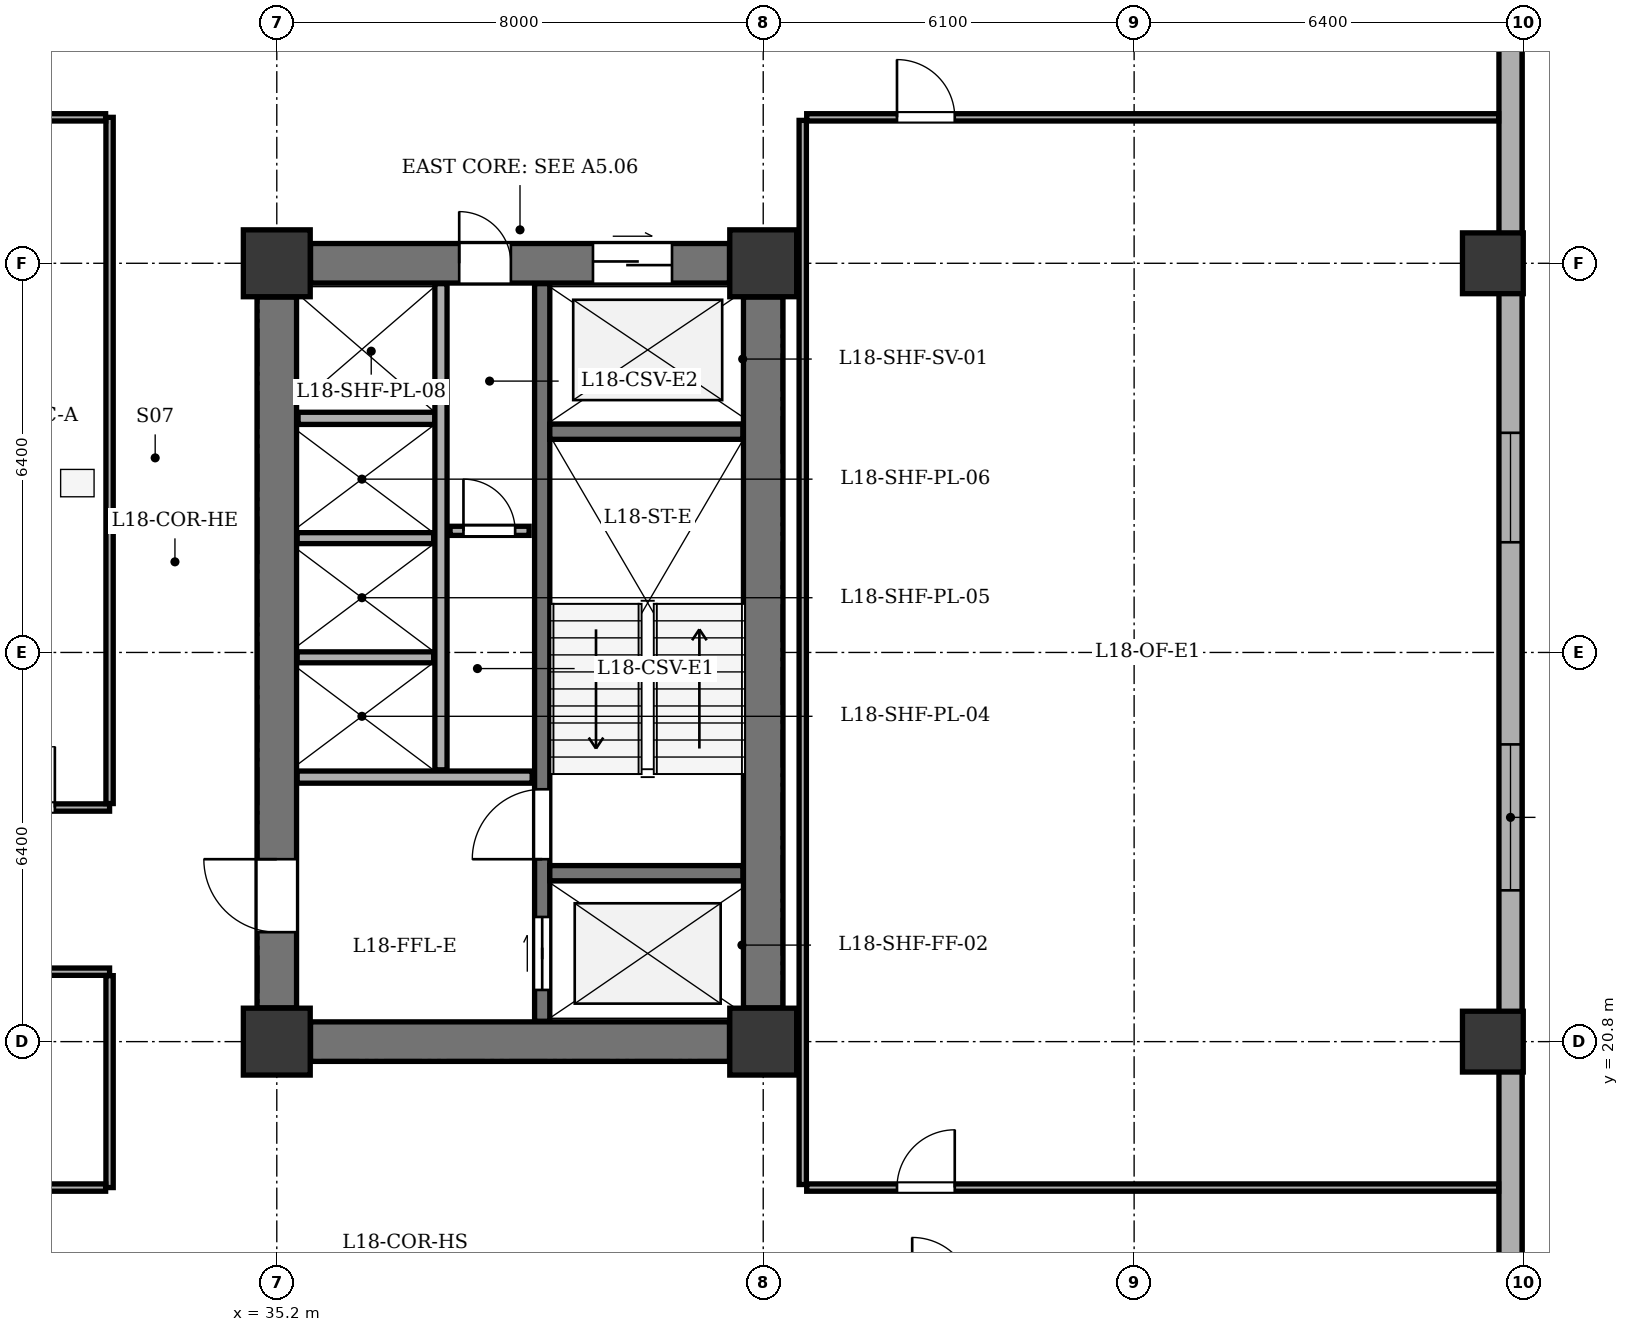
"""IFC4 building model, lengths in metres.
Left out: names, types, materials, properties, quantities, classifications, styles, units other than length and angle.
Written with IfcOpenShell. Run it as: python <this file> out.ifc"""

import sys

from ifc_helpers import new_model, si_unit, direction, frame, frame_2d, origin, origin_2d, place, context, subcontext, project, spatial, rectangle, extrude, element, fill, save


model = new_model("IFC4")
c1 = context("Model", 3, precision=1e-05, world=origin(), true_north=direction((0.0, 1.0)))
c2 = subcontext(c1, "Body", "Model", "MODEL_VIEW")
j1 = project(units=[si_unit("LENGTHUNIT", "METRE"), si_unit("PLANEANGLEUNIT", "RADIAN")], contexts=[c1])
p1 = place(None, origin())
s1 = spatial("IfcSite", under=j1, at=p1, CompositionType="ELEMENT")
p2 = place(p1, origin())
s2 = spatial("IfcBuilding", under=s1, at=p2, CompositionType="ELEMENT")
p3 = place(p2, frame((0.0, 0.0, 75.0)))
s3 = spatial("IfcBuildingStorey", under=s2, at=p3, CompositionType="ELEMENT", Elevation=75.0)
for number, where, z_axis, x_axis in (
    (1, (35.2, 20.8, 0.0), (0.0, 0.0, 1.0), (1.0, 0.0, 0.0)),
    (2, (43.2, 20.8, 0.0), (0.0, 0.0, 1.0), (1.0, 0.0, 0.0)),
    (3, (35.2, 33.6, 0.0), (0.0, 0.0, 1.0), (1.0, 0.0, 0.0)),
    (4, (43.2, 33.6, 0.0), (0.0, 0.0, 1.0), (1.0, 0.0, 0.0)),
):
    element("IfcColumn", number, at=place(p3, frame(where, z_axis=z_axis, x_axis=x_axis)), inside=s3, PredefinedType="COLUMN", context=c2, shape_type="SweptSolid", body=[
        extrude(rectangle(XDim=1.1, YDim=1.1, at=origin_2d()), origin(), (0.0, 0.0, 1.0), 3.9),
    ])
for number, where, z_axis, x_axis in (
    (5, (55.2, 20.8, 0.0), (0.0, 0.0, 1.0), (1.0, 0.0, 0.0)),
    (6, (55.2, 33.6, 0.0), (0.0, 0.0, 1.0), (1.0, 0.0, 0.0)),
):
    element("IfcColumn", number, at=place(p3, frame(where, z_axis=z_axis, x_axis=x_axis)), inside=s3, PredefinedType="COLUMN", context=c2, shape_type="SweptSolid", body=[
        extrude(rectangle(XDim=1.0, YDim=1.0, at=origin_2d()), origin(), (0.0, 0.0, 1.0), 3.9),
    ])
p4 = place(p3, frame((55.49, 47.9, 0.0), z_axis=(0.0, 0.0, 1.0), x_axis=(0.0, -1.0, 0.0)))
e7 = element("IfcWall", 7, at=p4, inside=s3, PredefinedType="STANDARD", context=c2, shape_type="SweptSolid", body=[
    extrude(rectangle(XDim=35.0, YDim=0.38, at=frame_2d((17.5, 0.0))), origin(), (0.0, 0.0, 1.0), 3.135),
])
p5 = place(p4, frame((2.693, 0.0, 0.8)))
e8 = element("IfcOpeningElement", 8, at=p5, cuts=e7, PredefinedType="OPENING", context=c2, shape_type="SweptSolid", body=[
    extrude(rectangle(XDim=1.8, YDim=1.9, at=frame_2d((0.9, 0.95))), frame((0.0, 0.2, 0.0), z_axis=(0.0, -1.0, 0.0), x_axis=(1.0, 0.0, 0.0)), (0.0, 0.0, 1.0), 0.4),
])
p6 = place(p4, frame((7.457, 0.0, 0.8)))
e9 = element("IfcOpeningElement", 9, at=p6, cuts=e7, PredefinedType="OPENING", context=c2, shape_type="SweptSolid", body=[
    extrude(rectangle(XDim=2.4, YDim=1.9, at=frame_2d((1.2, 0.95))), frame((0.0, 0.2, 0.0), z_axis=(0.0, -1.0, 0.0), x_axis=(1.0, 0.0, 0.0)), (0.0, 0.0, 1.0), 0.4),
])
p7 = place(p4, frame((17.088, 0.0, 0.8)))
e10 = element("IfcOpeningElement", 10, at=p7, cuts=e7, PredefinedType="OPENING", context=c2, shape_type="SweptSolid", body=[
    extrude(rectangle(XDim=1.8, YDim=1.9, at=frame_2d((0.9, 0.95))), frame((0.0, 0.2, 0.0), z_axis=(0.0, -1.0, 0.0), x_axis=(1.0, 0.0, 0.0)), (0.0, 0.0, 1.0), 0.4),
])
p8 = place(p4, frame((22.212, 0.0, 0.8)))
e11 = element("IfcOpeningElement", 11, at=p8, cuts=e7, PredefinedType="OPENING", context=c2, shape_type="SweptSolid", body=[
    extrude(rectangle(XDim=2.4, YDim=1.9, at=frame_2d((1.2, 0.95))), frame((0.0, 0.2, 0.0), z_axis=(0.0, -1.0, 0.0), x_axis=(1.0, 0.0, 0.0)), (0.0, 0.0, 1.0), 0.4),
])
p9 = place(p4, frame((31.175, 0.0, 0.8)))
e12 = element("IfcOpeningElement", 12, at=p9, cuts=e7, PredefinedType="OPENING", context=c2, shape_type="SweptSolid", body=[
    extrude(rectangle(XDim=1.8, YDim=1.9, at=frame_2d((0.9, 0.95))), frame((0.0, 0.2, 0.0), z_axis=(0.0, -1.0, 0.0), x_axis=(1.0, 0.0, 0.0)), (0.0, 0.0, 1.0), 0.4),
])
p10 = place(p3, frame((43.2, 21.355, 0.0), z_axis=(0.0, 0.0, 1.0), x_axis=(0.0, 1.0, 0.0)))
e13 = element("IfcWall", 13, at=p10, inside=s3, PredefinedType="SHEAR", context=c2, shape_type="SweptSolid", body=[
    extrude(rectangle(XDim=11.69, YDim=0.65, at=frame_2d((5.845, 0.0))), origin(), (0.0, 0.0, 1.0), 3.6),
])
p11 = place(p3, frame((35.755, 20.8, 0.0), z_axis=(0.0, 0.0, 1.0), x_axis=(1.0, 0.0, 0.0)))
e14 = element("IfcWall", 14, at=p11, inside=s3, PredefinedType="SHEAR", context=c2, shape_type="SweptSolid", body=[
    extrude(rectangle(XDim=6.89, YDim=0.65, at=frame_2d((3.445, 0.0))), origin(), (0.0, 0.0, 1.0), 3.6),
])
p12 = place(p3, frame((35.755, 33.6, 0.0), z_axis=(0.0, 0.0, 1.0), x_axis=(1.0, 0.0, 0.0)))
e15 = element("IfcWall", 15, at=p12, inside=s3, PredefinedType="SHEAR", context=c2, shape_type="SweptSolid", body=[
    extrude(rectangle(XDim=6.89, YDim=0.65, at=frame_2d((3.445, 0.0))), origin(), (0.0, 0.0, 1.0), 3.6),
])
p13 = place(p12, frame((4.645, 0.0, 0.0)))
e16 = element("IfcOpeningElement", 16, at=p13, cuts=e15, PredefinedType="OPENING", context=c2, shape_type="SweptSolid", body=[
    extrude(rectangle(XDim=1.3, YDim=2.15, at=frame_2d((0.65, 1.075))), frame((0.0, 0.335, 0.0), z_axis=(0.0, -1.0, 0.0), x_axis=(1.0, 0.0, 0.0)), (0.0, 0.0, 1.0), 0.67),
])
p14 = place(p12, frame((2.445, 0.0, 0.0)))
e17 = element("IfcOpeningElement", 17, at=p14, cuts=e15, PredefinedType="OPENING", context=c2, shape_type="SweptSolid", body=[
    extrude(rectangle(XDim=0.85, YDim=2.02, at=frame_2d((0.425, 1.01))), frame((0.0, 0.335, 0.0), z_axis=(0.0, -1.0, 0.0), x_axis=(1.0, 0.0, 0.0)), (0.0, 0.0, 1.0), 0.67),
])
p15 = place(p3, frame((35.2, 21.355, 0.0), z_axis=(0.0, 0.0, 1.0), x_axis=(0.0, 1.0, 0.0)))
e18 = element("IfcWall", 18, at=p15, inside=s3, PredefinedType="SHEAR", context=c2, shape_type="SweptSolid", body=[
    extrude(rectangle(XDim=11.69, YDim=0.65, at=frame_2d((5.845, 0.0))), origin(), (0.0, 0.0, 1.0), 3.6),
])
p16 = place(p15, frame((1.245, 0.0, 0.0)))
e19 = element("IfcOpeningElement", 19, at=p16, cuts=e18, PredefinedType="OPENING", context=c2, shape_type="SweptSolid", body=[
    extrude(rectangle(XDim=1.2, YDim=2.15, at=frame_2d((0.6, 1.075))), frame((0.0, 0.335, 0.0), z_axis=(0.0, -1.0, 0.0), x_axis=(1.0, 0.0, 0.0)), (0.0, 0.0, 1.0), 0.67),
])
p17 = place(p3, frame((39.565, 21.135, 0.0), z_axis=(0.0, 0.0, 1.0), x_axis=(0.0, 1.0, 0.0)))
e20 = element("IfcWall", 20, at=p17, inside=s3, PredefinedType="SHEAR", context=c2, shape_type="SweptSolid", body=[
    extrude(rectangle(XDim=12.13, YDim=0.25, at=frame_2d((6.065, 0.0))), origin(), (0.0, 0.0, 1.0), 3.6),
])
p18 = place(p17, frame((0.515, 0.0, 0.0)))
e21 = element("IfcOpeningElement", 21, at=p18, cuts=e20, PredefinedType="OPENING", context=c2, shape_type="SweptSolid", body=[
    extrude(rectangle(XDim=1.2, YDim=2.15, at=frame_2d((0.6, 1.075))), frame((0.0, 0.135, 0.0), z_axis=(0.0, -1.0, 0.0), x_axis=(1.0, 0.0, 0.0)), (0.0, 0.0, 1.0), 0.27),
])
p19 = place(p17, frame((2.665, 0.0, 0.0)))
e22 = element("IfcOpeningElement", 22, at=p19, cuts=e20, PredefinedType="OPENING", context=c2, shape_type="SweptSolid", body=[
    extrude(rectangle(XDim=1.15, YDim=2.15, at=frame_2d((0.575, 1.075))), frame((0.0, 0.135, 0.0), z_axis=(0.0, -1.0, 0.0), x_axis=(1.0, 0.0, 0.0)), (0.0, 0.0, 1.0), 0.27),
])
for number, where, z_axis, x_axis in (
    (23, (39.69, 23.57, 0.0), (0.0, 0.0, 1.0), (1.0, 0.0, 0.0)),
    (24, (39.69, 30.83, 0.0), (0.0, 0.0, 1.0), (1.0, 0.0, 0.0)),
):
    element("IfcWall", number, at=place(p3, frame(where, z_axis=z_axis, x_axis=x_axis)), inside=s3, PredefinedType="SHEAR", context=c2, shape_type="SweptSolid", body=[
        extrude(rectangle(XDim=3.175, YDim=0.25, at=frame_2d((1.587, 0.0))), origin(), (0.0, 0.0, 1.0), 3.6),
    ])
p20 = place(p3, frame((35.535, 25.15, 0.0), z_axis=(0.0, 0.0, 1.0), x_axis=(1.0, 0.0, 0.0)))
e25 = element("IfcWall", 25, at=p20, inside=s3, PredefinedType="SOLIDWALL", context=c2, shape_type="SweptSolid", body=[
    extrude(rectangle(XDim=3.865, YDim=0.2, at=frame_2d((1.933, 0.0))), origin(), (0.0, 0.0, 1.0), 3.6),
])
p21 = place(p3, frame((35.55, 31.05, 0.0), z_axis=(0.0, 0.0, 1.0), x_axis=(1.0, 0.0, 0.0)))
e26 = element("IfcWall", 26, at=p21, inside=s3, PredefinedType="SOLIDWALL", context=c2, shape_type="SweptSolid", body=[
    extrude(rectangle(XDim=2.25, YDim=0.2, at=frame_2d((1.125, 0.0))), origin(), (0.0, 0.0, 1.0), 3.6),
])
p22 = place(p3, frame((37.9, 25.27, 0.0), z_axis=(0.0, 0.0, 1.0), x_axis=(0.0, 1.0, 0.0)))
e27 = element("IfcWall", 27, at=p22, inside=s3, PredefinedType="SOLIDWALL", context=c2, shape_type="SweptSolid", body=[
    extrude(rectangle(XDim=7.995, YDim=0.2, at=frame_2d((3.998, 0.0))), origin(), (0.0, 0.0, 1.0), 3.6),
])
for number, where, z_axis, x_axis in (
    (28, (35.535, 27.12, 0.0), (0.0, 0.0, 1.0), (1.0, 0.0, 0.0)),
    (29, (35.535, 29.08, 0.0), (0.0, 0.0, 1.0), (1.0, 0.0, 0.0)),
):
    element("IfcWall", number, at=place(p3, frame(where, z_axis=z_axis, x_axis=x_axis)), inside=s3, PredefinedType="PARTITIONING", context=c2, shape_type="SweptSolid", body=[
        extrude(rectangle(XDim=2.245, YDim=0.18, at=frame_2d((1.123, 0.0))), origin(), (0.0, 0.0, 1.0), 3.6),
    ])
p23 = place(p3, frame((38.05, 29.2, 0.0), z_axis=(0.0, 0.0, 1.0), x_axis=(1.0, 0.0, 0.0)))
e30 = element("IfcWall", 30, at=p23, inside=s3, PredefinedType="PARTITIONING", context=c2, shape_type="SweptSolid", body=[
    extrude(rectangle(XDim=1.3, YDim=0.15, at=frame_2d((0.65, 0.0))), origin(), (0.0, 0.0, 1.0), 3.6),
])
p24 = place(p23, frame((0.22, 0.0, 0.0)))
e31 = element("IfcOpeningElement", 31, at=p24, cuts=e30, PredefinedType="OPENING", context=c2, shape_type="SweptSolid", body=[
    extrude(rectangle(XDim=0.85, YDim=2.02, at=frame_2d((0.425, 1.01))), frame((0.0, 0.085, 0.0), z_axis=(0.0, -1.0, 0.0), x_axis=(1.0, 0.0, 0.0)), (0.0, 0.0, 1.0), 0.17),
])
p25 = place(p3, frame((23.55, 24.65, 0.0), z_axis=(0.0, 0.0, 1.0), x_axis=(1.0, 0.0, 0.0)))
e32 = element("IfcWall", 32, at=p25, inside=s3, PredefinedType="PARTITIONING", context=c2, shape_type="SweptSolid", body=[
    extrude(rectangle(XDim=8.9, YDim=0.12, at=frame_2d((4.45, 0.0))), origin(), (0.0, 0.0, 1.0), 3.135),
])
p26 = place(p25, frame((1.0, 0.0, 0.0)))
e33 = element("IfcOpeningElement", 33, at=p26, cuts=e32, PredefinedType="OPENING", context=c2, shape_type="SweptSolid", body=[
    extrude(rectangle(XDim=0.95, YDim=2.1, at=frame_2d((0.475, 1.05))), frame((0.0, 0.07, 0.0), z_axis=(0.0, -1.0, 0.0), x_axis=(1.0, 0.0, 0.0)), (0.0, 0.0, 1.0), 0.14),
])
p27 = place(p25, frame((4.1, 0.0, 0.0)))
e34 = element("IfcOpeningElement", 34, at=p27, cuts=e32, PredefinedType="OPENING", context=c2, shape_type="SweptSolid", body=[
    extrude(rectangle(XDim=0.95, YDim=2.1, at=frame_2d((0.475, 1.05))), frame((0.0, 0.07, 0.0), z_axis=(0.0, -1.0, 0.0), x_axis=(1.0, 0.0, 0.0)), (0.0, 0.0, 1.0), 0.14),
])
p28 = place(p25, frame((7.0, 0.0, 0.0)))
e35 = element("IfcOpeningElement", 35, at=p28, cuts=e32, PredefinedType="OPENING", context=c2, shape_type="SweptSolid", body=[
    extrude(rectangle(XDim=1.0, YDim=2.1, at=frame_2d((0.5, 1.05))), frame((0.0, 0.07, 0.0), z_axis=(0.0, -1.0, 0.0), x_axis=(1.0, 0.0, 0.0)), (0.0, 0.0, 1.0), 0.14),
])
p29 = place(p3, frame((32.45, 24.715, 0.0), z_axis=(0.0, 0.0, 1.0), x_axis=(0.0, 1.0, 0.0)))
e36 = element("IfcWall", 36, at=p29, inside=s3, PredefinedType="PARTITIONING", context=c2, shape_type="SweptSolid", body=[
    extrude(rectangle(XDim=11.285, YDim=0.12, at=frame_2d((5.643, 0.0))), origin(), (0.0, 0.0, 1.0), 3.6),
])
p30 = place(p3, frame((23.615, 36.0, 0.0), z_axis=(0.0, 0.0, 1.0), x_axis=(1.0, 0.0, 0.0)))
e37 = element("IfcWall", 37, at=p30, inside=s3, PredefinedType="PARTITIONING", context=c2, shape_type="SweptSolid", body=[
    extrude(rectangle(XDim=8.77, YDim=0.12, at=frame_2d((4.385, 0.0))), origin(), (0.0, 0.0, 1.0), 3.6),
])
p31 = place(p3, frame((23.55, 21.95, 0.0), z_axis=(0.0, 0.0, 1.0), x_axis=(1.0, 0.0, 0.0)))
e38 = element("IfcWall", 38, at=p31, inside=s3, PredefinedType="PARTITIONING", context=c2, shape_type="SweptSolid", body=[
    extrude(rectangle(XDim=8.9, YDim=0.12, at=frame_2d((4.45, 0.0))), origin(), (0.0, 0.0, 1.0), 3.135),
])
p32 = place(p31, frame((3.6, 0.0, 0.0)))
e39 = element("IfcOpeningElement", 39, at=p32, cuts=e38, PredefinedType="OPENING", context=c2, shape_type="SweptSolid", body=[
    extrude(rectangle(XDim=1.1, YDim=2.15, at=frame_2d((0.55, 1.075))), frame((0.0, 0.07, 0.0), z_axis=(0.0, -1.0, 0.0), x_axis=(1.0, 0.0, 0.0)), (0.0, 0.0, 1.0), 0.14),
])
p33 = place(p3, frame((32.45, 18.4, 0.0), z_axis=(0.0, 0.0, 1.0), x_axis=(0.0, 1.0, 0.0)))
e40 = element("IfcWall", 40, at=p33, inside=s3, PredefinedType="PARTITIONING", context=c2, shape_type="SweptSolid", body=[
    extrude(rectangle(XDim=3.485, YDim=0.12, at=frame_2d((1.743, 0.0))), origin(), (0.0, 0.0, 1.0), 3.6),
])
p34 = place(p3, frame((23.615, 18.4, 0.0), z_axis=(0.0, 0.0, 1.0), x_axis=(1.0, 0.0, 0.0)))
e41 = element("IfcWall", 41, at=p34, inside=s3, PredefinedType="PARTITIONING", context=c2, shape_type="SweptSolid", body=[
    extrude(rectangle(XDim=8.77, YDim=0.12, at=frame_2d((4.385, 0.0))), origin(), (0.0, 0.0, 1.0), 3.6),
])
p35 = place(p3, frame((43.85, 18.45, 0.0), z_axis=(0.0, 0.0, 1.0), x_axis=(0.0, 1.0, 0.0)))
e42 = element("IfcWall", 42, at=p35, inside=s3, PredefinedType="PARTITIONING", context=c2, shape_type="SweptSolid", body=[
    extrude(rectangle(XDim=17.5, YDim=0.12, at=frame_2d((8.75, 0.0))), origin(), (0.0, 0.0, 1.0), 3.6),
])
p36 = place(p3, frame((43.915, 18.4, 0.0), z_axis=(0.0, 0.0, 1.0), x_axis=(1.0, 0.0, 0.0)))
e43 = element("IfcWall", 43, at=p36, inside=s3, PredefinedType="PARTITIONING", context=c2, shape_type="SweptSolid", body=[
    extrude(rectangle(XDim=11.38, YDim=0.12, at=frame_2d((5.69, 0.0))), origin(), (0.0, 0.0, 1.0), 3.6),
])
p37 = place(p36, frame((1.485, 0.0, 0.0)))
e44 = element("IfcOpeningElement", 44, at=p37, cuts=e43, PredefinedType="OPENING", context=c2, shape_type="SweptSolid", body=[
    extrude(rectangle(XDim=0.95, YDim=2.1, at=frame_2d((0.475, 1.05))), frame((0.0, 0.07, 0.0), z_axis=(0.0, -1.0, 0.0), x_axis=(1.0, 0.0, 0.0)), (0.0, 0.0, 1.0), 0.14),
])
p38 = place(p3, frame((43.915, 36.0, 0.0), z_axis=(0.0, 0.0, 1.0), x_axis=(1.0, 0.0, 0.0)))
e45 = element("IfcWall", 45, at=p38, inside=s3, PredefinedType="PARTITIONING", context=c2, shape_type="SweptSolid", body=[
    extrude(rectangle(XDim=11.38, YDim=0.12, at=frame_2d((5.69, 0.0))), origin(), (0.0, 0.0, 1.0), 3.6),
])
p39 = place(p38, frame((1.485, 0.0, 0.0)))
e46 = element("IfcOpeningElement", 46, at=p39, cuts=e45, PredefinedType="OPENING", context=c2, shape_type="SweptSolid", body=[
    extrude(rectangle(XDim=0.95, YDim=2.1, at=frame_2d((0.475, 1.05))), frame((0.0, 0.07, 0.0), z_axis=(0.0, -1.0, 0.0), x_axis=(1.0, 0.0, 0.0)), (0.0, 0.0, 1.0), 0.14),
])
p40 = place(p7, origin())
e47 = element("IfcWindow", 47, at=p40, inside=s3, PartitioningType="SINGLE_PANEL", PredefinedType="WINDOW", context=c2, shape_type="SweptSolid", body=[
    extrude(rectangle(XDim=1.8, YDim=1.9, at=frame_2d((0.9, 0.95))), frame((0.0, -0.01, 0.0), z_axis=(0.0, -1.0, 0.0), x_axis=(1.0, 0.0, 0.0)), (0.0, 0.0, 1.0), 0.06),
])
fill(e10, e47)
p41 = place(p8, origin())
e48 = element("IfcWindow", 48, at=p41, inside=s3, PartitioningType="SINGLE_PANEL", PredefinedType="WINDOW", context=c2, shape_type="SweptSolid", body=[
    extrude(rectangle(XDim=2.4, YDim=1.9, at=frame_2d((1.2, 0.95))), frame((0.0, -0.01, 0.0), z_axis=(0.0, -1.0, 0.0), x_axis=(1.0, 0.0, 0.0)), (0.0, 0.0, 1.0), 0.06),
])
fill(e11, e48)
p42 = place(p13, origin())
e49 = element("IfcDoor", 49, at=p42, inside=s3, OperationType="DOUBLE_DOOR_SLIDING", PredefinedType="DOOR", context=c2, shape_type="SweptSolid", body=[
    extrude(rectangle(XDim=1.3, YDim=2.15, at=frame_2d((0.65, 1.075))), frame((0.0, 0.025, 0.0), z_axis=(0.0, -1.0, 0.0), x_axis=(1.0, 0.0, 0.0)), (0.0, 0.0, 1.0), 0.05),
])
fill(e16, e49)
p43 = place(p14, origin())
e50 = element("IfcDoor", 50, at=p43, inside=s3, OperationType="SINGLE_SWING_LEFT", PredefinedType="DOOR", context=c2, shape_type="SweptSolid", body=[
    extrude(rectangle(XDim=0.85, YDim=2.02, at=frame_2d((0.425, 1.01))), frame((0.0, 0.025, 0.0), z_axis=(0.0, -1.0, 0.0), x_axis=(1.0, 0.0, 0.0)), (0.0, 0.0, 1.0), 0.05),
])
fill(e17, e50)
p44 = place(p16, origin())
e51 = element("IfcDoor", 51, at=p44, inside=s3, OperationType="SINGLE_SWING_RIGHT", PredefinedType="DOOR", context=c2, shape_type="SweptSolid", body=[
    extrude(rectangle(XDim=1.2, YDim=2.15, at=frame_2d((0.6, 1.075))), frame((0.0, 0.025, 0.0), z_axis=(0.0, -1.0, 0.0), x_axis=(1.0, 0.0, 0.0)), (0.0, 0.0, 1.0), 0.05),
])
fill(e19, e51)
p45 = place(p18, origin())
e52 = element("IfcDoor", 52, at=p45, inside=s3, OperationType="DOUBLE_DOOR_SLIDING", PredefinedType="DOOR", context=c2, shape_type="SweptSolid", body=[
    extrude(rectangle(XDim=1.2, YDim=2.15, at=frame_2d((0.6, 1.075))), frame((0.0, 0.025, 0.0), z_axis=(0.0, -1.0, 0.0), x_axis=(1.0, 0.0, 0.0)), (0.0, 0.0, 1.0), 0.05),
])
fill(e21, e52)
p46 = place(p19, origin())
e53 = element("IfcDoor", 53, at=p46, inside=s3, OperationType="SINGLE_SWING_LEFT", PredefinedType="DOOR", context=c2, shape_type="SweptSolid", body=[
    extrude(rectangle(XDim=1.15, YDim=2.15, at=frame_2d((0.575, 1.075))), frame((0.0, 0.025, 0.0), z_axis=(0.0, -1.0, 0.0), x_axis=(1.0, 0.0, 0.0)), (0.0, 0.0, 1.0), 0.05),
])
fill(e22, e53)
p47 = place(p24, origin())
e54 = element("IfcDoor", 54, at=p47, inside=s3, OperationType="SINGLE_SWING_LEFT", PredefinedType="DOOR", context=c2, shape_type="SweptSolid", body=[
    extrude(rectangle(XDim=0.85, YDim=2.02, at=frame_2d((0.425, 1.01))), frame((0.0, 0.025, 0.0), z_axis=(0.0, -1.0, 0.0), x_axis=(1.0, 0.0, 0.0)), (0.0, 0.0, 1.0), 0.05),
])
fill(e31, e54)
p48 = place(p28, origin())
e55 = element("IfcDoor", 55, at=p48, inside=s3, OperationType="SINGLE_SWING_RIGHT", PredefinedType="DOOR", context=c2, shape_type="SweptSolid", body=[
    extrude(rectangle(XDim=1.0, YDim=2.1, at=frame_2d((0.5, 1.05))), frame((0.0, 0.025, 0.0), z_axis=(0.0, -1.0, 0.0), x_axis=(1.0, 0.0, 0.0)), (0.0, 0.0, 1.0), 0.05),
])
fill(e35, e55)
p49 = place(p37, origin())
e56 = element("IfcDoor", 56, at=p49, inside=s3, OperationType="SINGLE_SWING_RIGHT", PredefinedType="DOOR", context=c2, shape_type="SweptSolid", body=[
    extrude(rectangle(XDim=0.95, YDim=2.1, at=frame_2d((0.475, 1.05))), frame((0.0, 0.025, 0.0), z_axis=(0.0, -1.0, 0.0), x_axis=(1.0, 0.0, 0.0)), (0.0, 0.0, 1.0), 0.05),
])
fill(e44, e56)
p50 = place(p39, origin())
e57 = element("IfcDoor", 57, at=p50, inside=s3, OperationType="SINGLE_SWING_LEFT", PredefinedType="DOOR", context=c2, shape_type="SweptSolid", body=[
    extrude(rectangle(XDim=0.95, YDim=2.1, at=frame_2d((0.475, 1.05))), frame((0.0, 0.025, 0.0), z_axis=(0.0, -1.0, 0.0), x_axis=(1.0, 0.0, 0.0)), (0.0, 0.0, 1.0), 0.05),
])
fill(e46, e57)
save(model, sys.argv[1])
